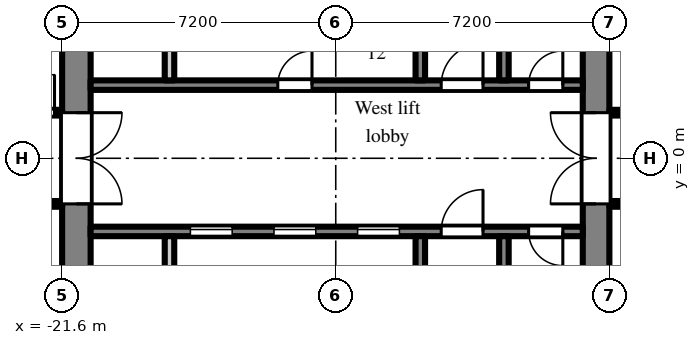
"""IFC4 building model, lengths in metres.
Left out: names, types, materials, properties, quantities, classifications, styles, units other than length and angle.
Written with IfcOpenShell. Run it as: python <this file> out.ifc"""

import sys

from ifc_helpers import new_model, si_unit, direction, frame, frame_2d, origin, place, context, subcontext, project, spatial, rectangle, extrude, element, fill, save


model = new_model("IFC4")
c1 = context("Model", 3, precision=1e-05, world=origin(), true_north=direction((0.0, 1.0)))
c2 = subcontext(c1, "Body", "Model", "MODEL_VIEW")
j1 = project(units=[si_unit("LENGTHUNIT", "METRE"), si_unit("PLANEANGLEUNIT", "RADIAN")], contexts=[c1])
p1 = place(None, origin())
s1 = spatial("IfcSite", under=j1, at=p1, CompositionType="ELEMENT")
p2 = place(p1, origin())
s2 = spatial("IfcBuilding", under=s1, at=p2, CompositionType="ELEMENT")
p3 = place(p2, frame((0.0, 0.0, 69.9)))
s3 = spatial("IfcBuildingStorey", under=s2, at=p3, CompositionType="ELEMENT", Elevation=69.9)
p4 = place(p3, frame((-7.55, -7.2, 0.0), z_axis=(0.0, 0.0, 1.0), x_axis=(0.0, 1.0, 0.0)))
e1 = element("IfcWall", 1, at=p4, inside=s3, PredefinedType="SHEAR", context=c2, shape_type="SweptSolid", body=[
    extrude(rectangle(XDim=14.4, YDim=0.7, at=frame_2d((7.2, 0.0))), origin(), (0.0, 0.0, 1.0), 2.575),
])
p5 = place(p4, frame((6.0, 0.0, 0.0)))
e2 = element("IfcOpeningElement", 2, at=p5, cuts=e1, PredefinedType="OPENING", context=c2, shape_type="SweptSolid", body=[
    extrude(rectangle(XDim=2.4, YDim=2.2, at=frame_2d((1.2, 1.1))), frame((0.0, 0.36, 0.0), z_axis=(0.0, -1.0, 0.0), x_axis=(1.0, 0.0, 0.0)), (0.0, 0.0, 1.0), 0.72),
])
p6 = place(p3, frame((-21.225, -7.2, 0.0), z_axis=(0.0, 0.0, 1.0), x_axis=(0.0, 1.0, 0.0)))
e3 = element("IfcWall", 3, at=p6, inside=s3, PredefinedType="SHEAR", context=c2, shape_type="SweptSolid", body=[
    extrude(rectangle(XDim=14.4, YDim=0.75, at=frame_2d((7.2, 0.0))), origin(), (0.0, 0.0, 1.0), 2.575),
])
p7 = place(p6, frame((6.0, 0.0, 0.0)))
e4 = element("IfcOpeningElement", 4, at=p7, cuts=e3, PredefinedType="OPENING", context=c2, shape_type="SweptSolid", body=[
    extrude(rectangle(XDim=2.4, YDim=2.2, at=frame_2d((1.2, 1.1))), frame((0.0, 0.385, 0.0), z_axis=(0.0, -1.0, 0.0), x_axis=(1.0, 0.0, 0.0)), (0.0, 0.0, 1.0), 0.77),
])
p8 = place(p3, frame((-7.9, 1.925, 0.0), z_axis=(0.0, 0.0, 1.0), x_axis=(-1.0, 0.0, 0.0)))
e5 = element("IfcWall", 5, at=p8, inside=s3, PredefinedType="SHEAR", context=c2, shape_type="SweptSolid", body=[
    extrude(rectangle(XDim=12.95, YDim=0.25, at=frame_2d((6.475, 0.0))), origin(), (0.0, 0.0, 1.0), 2.575),
])
p9 = place(p8, frame((0.525, 0.0, 0.0)))
e6 = element("IfcOpeningElement", 6, at=p9, cuts=e5, PredefinedType="OPENING", context=c2, shape_type="SweptSolid", body=[
    extrude(rectangle(XDim=0.9, YDim=2.1, at=frame_2d((0.45, 1.05))), frame((0.0, 0.135, 0.0), z_axis=(0.0, -1.0, 0.0), x_axis=(1.0, 0.0, 0.0)), (0.0, 0.0, 1.0), 0.27),
])
p10 = place(p8, frame((2.625, 0.0, 0.0)))
e7 = element("IfcOpeningElement", 7, at=p10, cuts=e5, PredefinedType="OPENING", context=c2, shape_type="SweptSolid", body=[
    extrude(rectangle(XDim=1.1, YDim=2.1, at=frame_2d((0.55, 1.05))), frame((0.0, 0.135, 0.0), z_axis=(0.0, -1.0, 0.0), x_axis=(1.0, 0.0, 0.0)), (0.0, 0.0, 1.0), 0.27),
])
p11 = place(p8, frame((7.125, 0.0, 0.0)))
e8 = element("IfcOpeningElement", 8, at=p11, cuts=e5, PredefinedType="OPENING", context=c2, shape_type="SweptSolid", body=[
    extrude(rectangle(XDim=0.9, YDim=2.1, at=frame_2d((0.45, 1.05))), frame((0.0, 0.135, 0.0), z_axis=(0.0, -1.0, 0.0), x_axis=(1.0, 0.0, 0.0)), (0.0, 0.0, 1.0), 0.27),
])
p12 = place(p3, frame((-9.975, 2.05, 0.0), z_axis=(0.0, 0.0, 1.0), x_axis=(0.0, 1.0, 0.0)))
e9 = element("IfcWall", 9, at=p12, inside=s3, PredefinedType="SHEAR", context=c2, shape_type="SweptSolid", body=[
    extrude(rectangle(XDim=4.65, YDim=0.25, at=frame_2d((2.325, 0.0))), origin(), (0.0, 0.0, 1.0), 2.575),
])
p13 = place(p12, frame((2.95, 0.0, 0.0)))
e10 = element("IfcOpeningElement", 10, at=p13, cuts=e9, PredefinedType="OPENING", context=c2, shape_type="SweptSolid", body=[
    extrude(rectangle(XDim=1.1, YDim=2.1, at=frame_2d((0.55, 1.05))), frame((0.0, 0.135, 0.0), z_axis=(0.0, -1.0, 0.0), x_axis=(1.0, 0.0, 0.0)), (0.0, 0.0, 1.0), 0.27),
])
p14 = place(p3, frame((-12.175, 2.05, 0.0), z_axis=(0.0, 0.0, 1.0), x_axis=(0.0, 1.0, 0.0)))
e11 = element("IfcWall", 11, at=p14, inside=s3, PredefinedType="SHEAR", context=c2, shape_type="SweptSolid", body=[
    extrude(rectangle(XDim=4.65, YDim=0.25, at=frame_2d((2.325, 0.0))), origin(), (0.0, 0.0, 1.0), 2.575),
])
p15 = place(p14, frame((2.95, 0.0, 0.0)))
e12 = element("IfcOpeningElement", 12, at=p15, cuts=e11, PredefinedType="OPENING", context=c2, shape_type="SweptSolid", body=[
    extrude(rectangle(XDim=1.1, YDim=2.1, at=frame_2d((0.55, 1.05))), frame((0.0, 0.135, 0.0), z_axis=(0.0, -1.0, 0.0), x_axis=(1.0, 0.0, 0.0)), (0.0, 0.0, 1.0), 0.27),
])
p16 = place(p3, frame((-18.775, 2.05, 0.0), z_axis=(0.0, 0.0, 1.0), x_axis=(0.0, 1.0, 0.0)))
e13 = element("IfcWall", 13, at=p16, inside=s3, PredefinedType="PARTITIONING", context=c2, shape_type="SweptSolid", body=[
    extrude(rectangle(XDim=2.1, YDim=0.25, at=frame_2d((1.05, 0.0))), origin(), (0.0, 0.0, 1.0), 2.575),
])
p17 = place(p3, frame((-7.9, -1.925, 0.0), z_axis=(0.0, 0.0, 1.0), x_axis=(-1.0, 0.0, 0.0)))
e14 = element("IfcWall", 14, at=p17, inside=s3, PredefinedType="SHEAR", context=c2, shape_type="SweptSolid", body=[
    extrude(rectangle(XDim=12.95, YDim=0.25, at=frame_2d((6.475, 0.0))), origin(), (0.0, 0.0, 1.0), 2.575),
])
p18 = place(p17, frame((4.825, 0.0, 0.0)))
e15 = element("IfcOpeningElement", 15, at=p18, cuts=e14, PredefinedType="OPENING", context=c2, shape_type="SweptSolid", body=[
    extrude(rectangle(XDim=1.1, YDim=2.1, at=frame_2d((0.55, 1.05))), frame((0.0, 0.135, 0.0), z_axis=(0.0, -1.0, 0.0), x_axis=(1.0, 0.0, 0.0)), (0.0, 0.0, 1.0), 0.27),
])
p19 = place(p17, frame((7.025, 0.0, 0.0)))
e16 = element("IfcOpeningElement", 16, at=p19, cuts=e14, PredefinedType="OPENING", context=c2, shape_type="SweptSolid", body=[
    extrude(rectangle(XDim=1.1, YDim=2.1, at=frame_2d((0.55, 1.05))), frame((0.0, 0.135, 0.0), z_axis=(0.0, -1.0, 0.0), x_axis=(1.0, 0.0, 0.0)), (0.0, 0.0, 1.0), 0.27),
])
p20 = place(p17, frame((9.225, 0.0, 0.0)))
e17 = element("IfcOpeningElement", 17, at=p20, cuts=e14, PredefinedType="OPENING", context=c2, shape_type="SweptSolid", body=[
    extrude(rectangle(XDim=1.1, YDim=2.1, at=frame_2d((0.55, 1.05))), frame((0.0, 0.135, 0.0), z_axis=(0.0, -1.0, 0.0), x_axis=(1.0, 0.0, 0.0)), (0.0, 0.0, 1.0), 0.27),
])
p21 = place(p17, frame((0.525, 0.0, 0.0)))
e18 = element("IfcOpeningElement", 18, at=p21, cuts=e14, PredefinedType="OPENING", context=c2, shape_type="SweptSolid", body=[
    extrude(rectangle(XDim=0.9, YDim=2.1, at=frame_2d((0.45, 1.05))), frame((0.0, 0.135, 0.0), z_axis=(0.0, -1.0, 0.0), x_axis=(1.0, 0.0, 0.0)), (0.0, 0.0, 1.0), 0.27),
])
p22 = place(p17, frame((2.625, 0.0, 0.0)))
e19 = element("IfcOpeningElement", 19, at=p22, cuts=e14, PredefinedType="OPENING", context=c2, shape_type="SweptSolid", body=[
    extrude(rectangle(XDim=1.1, YDim=2.1, at=frame_2d((0.55, 1.05))), frame((0.0, 0.135, 0.0), z_axis=(0.0, -1.0, 0.0), x_axis=(1.0, 0.0, 0.0)), (0.0, 0.0, 1.0), 0.27),
])
p23 = place(p3, frame((-9.975, -2.05, 0.0), z_axis=(0.0, 0.0, 1.0), x_axis=(0.0, -1.0, 0.0)))
e20 = element("IfcWall", 20, at=p23, inside=s3, PredefinedType="SHEAR", context=c2, shape_type="SweptSolid", body=[
    extrude(rectangle(XDim=4.65, YDim=0.25, at=frame_2d((2.325, 0.0))), origin(), (0.0, 0.0, 1.0), 2.575),
])
p24 = place(p23, frame((2.95, 0.0, 0.0)))
e21 = element("IfcOpeningElement", 21, at=p24, cuts=e20, PredefinedType="OPENING", context=c2, shape_type="SweptSolid", body=[
    extrude(rectangle(XDim=1.1, YDim=2.1, at=frame_2d((0.55, 1.05))), frame((0.0, 0.135, 0.0), z_axis=(0.0, -1.0, 0.0), x_axis=(1.0, 0.0, 0.0)), (0.0, 0.0, 1.0), 0.27),
])
p25 = place(p3, frame((-12.175, -2.05, 0.0), z_axis=(0.0, 0.0, 1.0), x_axis=(0.0, -1.0, 0.0)))
e22 = element("IfcWall", 22, at=p25, inside=s3, PredefinedType="SHEAR", context=c2, shape_type="SweptSolid", body=[
    extrude(rectangle(XDim=4.65, YDim=0.25, at=frame_2d((2.325, 0.0))), origin(), (0.0, 0.0, 1.0), 2.575),
])
p26 = place(p25, frame((2.95, 0.0, 0.0)))
e23 = element("IfcOpeningElement", 23, at=p26, cuts=e22, PredefinedType="OPENING", context=c2, shape_type="SweptSolid", body=[
    extrude(rectangle(XDim=1.1, YDim=2.1, at=frame_2d((0.55, 1.05))), frame((0.0, 0.135, 0.0), z_axis=(0.0, -1.0, 0.0), x_axis=(1.0, 0.0, 0.0)), (0.0, 0.0, 1.0), 0.27),
])
p27 = place(p3, frame((-18.775, -2.05, 0.0), z_axis=(0.0, 0.0, 1.0), x_axis=(0.0, -1.0, 0.0)))
e24 = element("IfcWall", 24, at=p27, inside=s3, PredefinedType="PARTITIONING", context=c2, shape_type="SweptSolid", body=[
    extrude(rectangle(XDim=2.1, YDim=0.25, at=frame_2d((1.05, 0.0))), origin(), (0.0, 0.0, 1.0), 2.575),
])
p28 = place(p3, frame((-36.5, -1.2, 0.0), z_axis=(0.0, 0.0, 1.0), x_axis=(1.0, 0.0, 0.0)))
e25 = element("IfcWall", 25, at=p28, inside=s3, PredefinedType="PARTITIONING", context=c2, shape_type="SweptSolid", body=[
    extrude(rectangle(XDim=14.9, YDim=0.15, at=frame_2d((7.45, 0.0))), origin(), (0.0, 0.0, 1.0), 2.575),
])
p29 = place(p28, frame((12.65, 0.0, 0.0)))
e26 = element("IfcOpeningElement", 26, at=p29, cuts=e25, PredefinedType="OPENING", context=c2, shape_type="SweptSolid", body=[
    extrude(rectangle(XDim=0.9, YDim=2.1, at=frame_2d((0.45, 1.05))), frame((0.0, 0.085, 0.0), z_axis=(0.0, -1.0, 0.0), x_axis=(1.0, 0.0, 0.0)), (0.0, 0.0, 1.0), 0.17),
])
p30 = place(p28, frame((9.95, 0.0, 0.0)))
e27 = element("IfcOpeningElement", 27, at=p30, cuts=e25, PredefinedType="OPENING", context=c2, shape_type="SweptSolid", body=[
    extrude(rectangle(XDim=0.9, YDim=2.1, at=frame_2d((0.45, 1.05))), frame((0.0, 0.085, 0.0), z_axis=(0.0, -1.0, 0.0), x_axis=(1.0, 0.0, 0.0)), (0.0, 0.0, 1.0), 0.17),
])
p31 = place(p28, frame((8.15, 0.0, 0.0)))
e28 = element("IfcOpeningElement", 28, at=p31, cuts=e25, PredefinedType="OPENING", context=c2, shape_type="SweptSolid", body=[
    extrude(rectangle(XDim=0.9, YDim=2.1, at=frame_2d((0.45, 1.05))), frame((0.0, 0.085, 0.0), z_axis=(0.0, -1.0, 0.0), x_axis=(1.0, 0.0, 0.0)), (0.0, 0.0, 1.0), 0.17),
])
p32 = place(p28, frame((6.1, 0.0, 0.0)))
e29 = element("IfcOpeningElement", 29, at=p32, cuts=e25, PredefinedType="OPENING", context=c2, shape_type="SweptSolid", body=[
    extrude(rectangle(XDim=1.0, YDim=2.1, at=frame_2d((0.5, 1.05))), frame((0.0, 0.085, 0.0), z_axis=(0.0, -1.0, 0.0), x_axis=(1.0, 0.0, 0.0)), (0.0, 0.0, 1.0), 0.17),
])
p33 = place(p28, frame((1.15, 0.0, 0.0)))
e30 = element("IfcOpeningElement", 30, at=p33, cuts=e25, PredefinedType="OPENING", context=c2, shape_type="SweptSolid", body=[
    extrude(rectangle(XDim=1.8, YDim=2.1, at=frame_2d((0.9, 1.05))), frame((0.0, 0.085, 0.0), z_axis=(0.0, -1.0, 0.0), x_axis=(1.0, 0.0, 0.0)), (0.0, 0.0, 1.0), 0.17),
])
p34 = place(p3, frame((-36.5, 1.2, 0.0), z_axis=(0.0, 0.0, 1.0), x_axis=(1.0, 0.0, 0.0)))
e31 = element("IfcWall", 31, at=p34, inside=s3, PredefinedType="PARTITIONING", context=c2, shape_type="SweptSolid", body=[
    extrude(rectangle(XDim=14.9, YDim=0.15, at=frame_2d((7.45, 0.0))), origin(), (0.0, 0.0, 1.0), 2.575),
])
p35 = place(p34, frame((13.7, 0.0, 0.0)))
e32 = element("IfcOpeningElement", 32, at=p35, cuts=e31, PredefinedType="OPENING", context=c2, shape_type="SweptSolid", body=[
    extrude(rectangle(XDim=1.0, YDim=2.1, at=frame_2d((0.5, 1.05))), frame((0.0, 0.085, 0.0), z_axis=(0.0, -1.0, 0.0), x_axis=(1.0, 0.0, 0.0)), (0.0, 0.0, 1.0), 0.17),
])
p36 = place(p34, frame((8.19, 0.0, 0.0)))
e33 = element("IfcOpeningElement", 33, at=p36, cuts=e31, PredefinedType="OPENING", context=c2, shape_type="SweptSolid", body=[
    extrude(rectangle(XDim=1.0, YDim=2.1, at=frame_2d((0.5, 1.05))), frame((0.0, 0.085, 0.0), z_axis=(0.0, -1.0, 0.0), x_axis=(1.0, 0.0, 0.0)), (0.0, 0.0, 1.0), 0.17),
])
p37 = place(p34, frame((1.15, 0.0, 0.0)))
e34 = element("IfcOpeningElement", 34, at=p37, cuts=e31, PredefinedType="OPENING", context=c2, shape_type="SweptSolid", body=[
    extrude(rectangle(XDim=1.8, YDim=2.1, at=frame_2d((0.9, 1.05))), frame((0.0, 0.085, 0.0), z_axis=(0.0, -1.0, 0.0), x_axis=(1.0, 0.0, 0.0)), (0.0, 0.0, 1.0), 0.17),
])
p38 = place(p3, frame((-7.2, -1.2, 0.0), z_axis=(0.0, 0.0, 1.0), x_axis=(1.0, 0.0, 0.0)))
e35 = element("IfcWall", 35, at=p38, inside=s3, PredefinedType="PARTITIONING", context=c2, shape_type="SweptSolid", body=[
    extrude(rectangle(XDim=6.075, YDim=0.15, at=frame_2d((3.038, 0.0))), origin(), (0.0, 0.0, 1.0), 2.575),
])
p39 = place(p38, frame((0.55, 0.0, 0.0)))
e36 = element("IfcOpeningElement", 36, at=p39, cuts=e35, PredefinedType="OPENING", context=c2, shape_type="SweptSolid", body=[
    extrude(rectangle(XDim=0.9, YDim=2.1, at=frame_2d((0.45, 1.05))), frame((0.0, 0.085, 0.0), z_axis=(0.0, -1.0, 0.0), x_axis=(1.0, 0.0, 0.0)), (0.0, 0.0, 1.0), 0.17),
])
p40 = place(p3, frame((-7.2, 1.2, 0.0), z_axis=(0.0, 0.0, 1.0), x_axis=(1.0, 0.0, 0.0)))
e37 = element("IfcWall", 37, at=p40, inside=s3, PredefinedType="PARTITIONING", context=c2, shape_type="SweptSolid", body=[
    extrude(rectangle(XDim=6.075, YDim=0.15, at=frame_2d((3.038, 0.0))), origin(), (0.0, 0.0, 1.0), 2.575),
])
p41 = place(p40, frame((1.95, 0.0, 0.0)))
e38 = element("IfcOpeningElement", 38, at=p41, cuts=e37, PredefinedType="OPENING", context=c2, shape_type="SweptSolid", body=[
    extrude(rectangle(XDim=0.9, YDim=2.1, at=frame_2d((0.45, 1.05))), frame((0.0, 0.085, 0.0), z_axis=(0.0, -1.0, 0.0), x_axis=(1.0, 0.0, 0.0)), (0.0, 0.0, 1.0), 0.17),
])
p42 = place(p18, origin())
e39 = element("IfcDoor", 39, at=p42, inside=s3, OperationType="SLIDING_TO_LEFT", PredefinedType="DOOR", context=c2, shape_type="SweptSolid", body=[
    extrude(rectangle(XDim=1.1, YDim=2.1, at=frame_2d((0.55, 1.05))), frame((0.0, 0.025, 0.0), z_axis=(0.0, -1.0, 0.0), x_axis=(1.0, 0.0, 0.0)), (0.0, 0.0, 1.0), 0.05),
])
fill(e15, e39)
p43 = place(p19, origin())
e40 = element("IfcDoor", 40, at=p43, inside=s3, OperationType="SLIDING_TO_LEFT", PredefinedType="DOOR", context=c2, shape_type="SweptSolid", body=[
    extrude(rectangle(XDim=1.1, YDim=2.1, at=frame_2d((0.55, 1.05))), frame((0.0, 0.025, 0.0), z_axis=(0.0, -1.0, 0.0), x_axis=(1.0, 0.0, 0.0)), (0.0, 0.0, 1.0), 0.05),
])
fill(e16, e40)
p44 = place(p20, origin())
e41 = element("IfcDoor", 41, at=p44, inside=s3, OperationType="SLIDING_TO_LEFT", PredefinedType="DOOR", context=c2, shape_type="SweptSolid", body=[
    extrude(rectangle(XDim=1.1, YDim=2.1, at=frame_2d((0.55, 1.05))), frame((0.0, 0.025, 0.0), z_axis=(0.0, -1.0, 0.0), x_axis=(1.0, 0.0, 0.0)), (0.0, 0.0, 1.0), 0.05),
])
fill(e17, e41)
p45 = place(p9, frame((0.9, 0.0, 0.0), z_axis=(0.0, 0.0, 1.0), x_axis=(-1.0, 0.0, 0.0)))
e42 = element("IfcDoor", 42, at=p45, inside=s3, OperationType="SINGLE_SWING_RIGHT", PredefinedType="DOOR", context=c2, shape_type="SweptSolid", body=[
    extrude(rectangle(XDim=0.9, YDim=2.1, at=frame_2d((0.45, 1.05))), frame((0.0, 0.025, 0.0), z_axis=(0.0, -1.0, 0.0), x_axis=(1.0, 0.0, 0.0)), (0.0, 0.0, 1.0), 0.05),
])
fill(e6, e42)
p46 = place(p21, origin())
e43 = element("IfcDoor", 43, at=p46, inside=s3, OperationType="SINGLE_SWING_LEFT", PredefinedType="DOOR", context=c2, shape_type="SweptSolid", body=[
    extrude(rectangle(XDim=0.9, YDim=2.1, at=frame_2d((0.45, 1.05))), frame((0.0, 0.025, 0.0), z_axis=(0.0, -1.0, 0.0), x_axis=(1.0, 0.0, 0.0)), (0.0, 0.0, 1.0), 0.05),
])
fill(e18, e43)
p47 = place(p10, frame((1.1, 0.0, 0.0), z_axis=(0.0, 0.0, 1.0), x_axis=(-1.0, 0.0, 0.0)))
e44 = element("IfcDoor", 44, at=p47, inside=s3, OperationType="SINGLE_SWING_RIGHT", PredefinedType="DOOR", context=c2, shape_type="SweptSolid", body=[
    extrude(rectangle(XDim=1.1, YDim=2.1, at=frame_2d((0.55, 1.05))), frame((0.0, 0.025, 0.0), z_axis=(0.0, -1.0, 0.0), x_axis=(1.0, 0.0, 0.0)), (0.0, 0.0, 1.0), 0.05),
])
fill(e7, e44)
p48 = place(p22, frame((1.1, 0.0, 0.0), z_axis=(0.0, 0.0, 1.0), x_axis=(-1.0, 0.0, 0.0)))
e45 = element("IfcDoor", 45, at=p48, inside=s3, OperationType="SINGLE_SWING_RIGHT", PredefinedType="DOOR", context=c2, shape_type="SweptSolid", body=[
    extrude(rectangle(XDim=1.1, YDim=2.1, at=frame_2d((0.55, 1.05))), frame((0.0, 0.025, 0.0), z_axis=(0.0, -1.0, 0.0), x_axis=(1.0, 0.0, 0.0)), (0.0, 0.0, 1.0), 0.05),
])
fill(e19, e45)
p49 = place(p5, origin())
e46 = element("IfcDoor", 46, at=p49, inside=s3, OperationType="DOUBLE_DOOR_DOUBLE_SWING", PredefinedType="DOOR", context=c2, shape_type="SweptSolid", body=[
    extrude(rectangle(XDim=2.4, YDim=2.2, at=frame_2d((1.2, 1.1))), frame((0.0, 0.025, 0.0), z_axis=(0.0, -1.0, 0.0), x_axis=(1.0, 0.0, 0.0)), (0.0, 0.0, 1.0), 0.05),
])
fill(e2, e46)
p50 = place(p7, frame((2.4, 0.0, 0.0), z_axis=(0.0, 0.0, 1.0), x_axis=(-1.0, 0.0, 0.0)))
e47 = element("IfcDoor", 47, at=p50, inside=s3, OperationType="DOUBLE_DOOR_DOUBLE_SWING", PredefinedType="DOOR", context=c2, shape_type="SweptSolid", body=[
    extrude(rectangle(XDim=2.4, YDim=2.2, at=frame_2d((1.2, 1.1))), frame((0.0, 0.025, 0.0), z_axis=(0.0, -1.0, 0.0), x_axis=(1.0, 0.0, 0.0)), (0.0, 0.0, 1.0), 0.05),
])
fill(e4, e47)
p51 = place(p11, frame((0.9, 0.0, 0.0), z_axis=(0.0, 0.0, 1.0), x_axis=(-1.0, 0.0, 0.0)))
e48 = element("IfcDoor", 48, at=p51, inside=s3, OperationType="SINGLE_SWING_RIGHT", PredefinedType="DOOR", context=c2, shape_type="SweptSolid", body=[
    extrude(rectangle(XDim=0.9, YDim=2.1, at=frame_2d((0.45, 1.05))), frame((0.0, 0.025, 0.0), z_axis=(0.0, -1.0, 0.0), x_axis=(1.0, 0.0, 0.0)), (0.0, 0.0, 1.0), 0.05),
])
fill(e8, e48)
p52 = place(p35, origin())
e49 = element("IfcDoor", 49, at=p52, inside=s3, OperationType="SINGLE_SWING_RIGHT", PredefinedType="DOOR", context=c2, shape_type="SweptSolid", body=[
    extrude(rectangle(XDim=1.0, YDim=2.1, at=frame_2d((0.5, 1.05))), frame((0.0, 0.025, 0.0), z_axis=(0.0, -1.0, 0.0), x_axis=(1.0, 0.0, 0.0)), (0.0, 0.0, 1.0), 0.05),
])
fill(e32, e49)
save(model, sys.argv[1])
